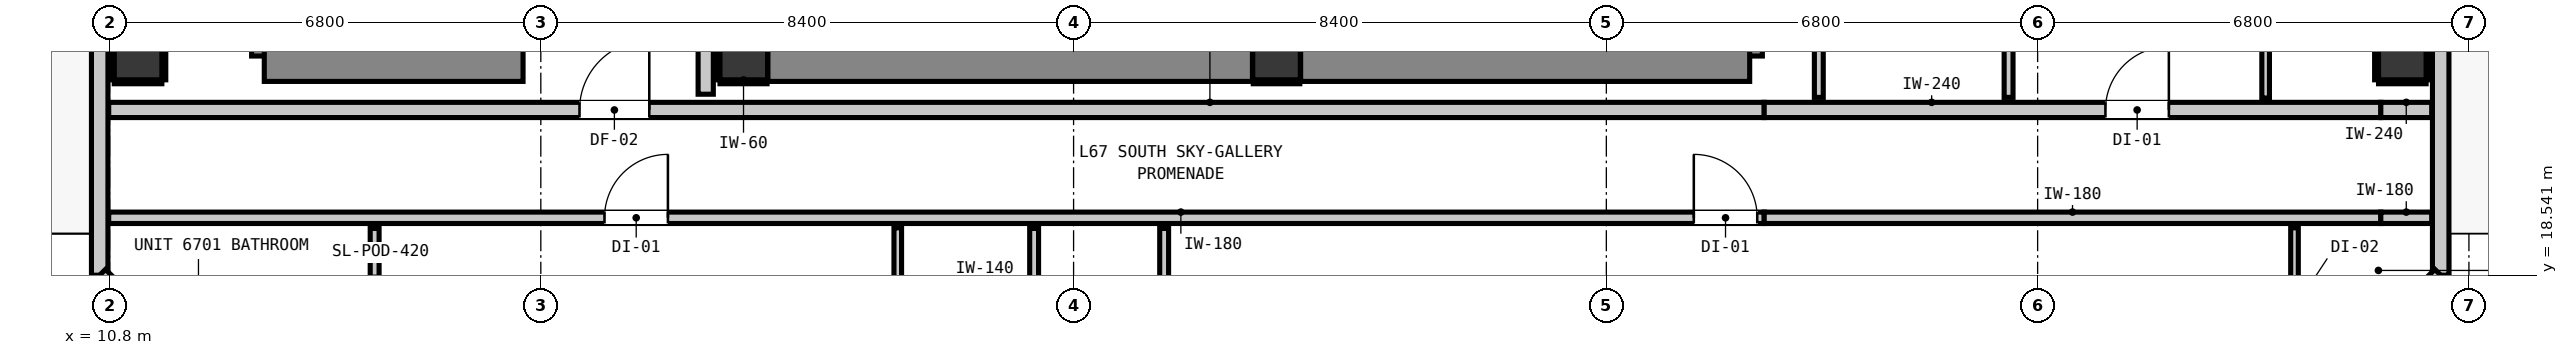
"""IFC4 building model, lengths in metres.
Left out: names, types, materials, properties, quantities, classifications, styles, units other than length and angle.
Written with IfcOpenShell. Run it as: python <this file> out.ifc"""

import sys

from ifc_helpers import new_model, si_unit, direction, frame, frame_2d, origin, origin_2d, place, context, subcontext, project, spatial, rectangle, extrude, element, fill, save


model = new_model("IFC4")
c1 = context("Model", 3, precision=1e-05, world=origin(), true_north=direction((0.0, 1.0)))
c2 = subcontext(c1, "Body", "Model", "MODEL_VIEW")
j1 = project(units=[si_unit("LENGTHUNIT", "METRE"), si_unit("PLANEANGLEUNIT", "RADIAN")], contexts=[c1])
p1 = place(None, origin())
s1 = spatial("IfcSite", under=j1, at=p1, CompositionType="ELEMENT")
p2 = place(p1, origin())
s2 = spatial("IfcBuilding", under=s1, at=p2, CompositionType="ELEMENT")
p3 = place(p2, frame((0.0, 0.0, 231.28)))
s3 = spatial("IfcBuildingStorey", under=s2, at=p3, CompositionType="ELEMENT", Elevation=231.28)
for number, where, z_axis, x_axis in (
    (1, (20.8, 22.0, 0.0), (0.0, 0.0, 1.0), (1.0, 0.0, 0.0)),
    (2, (29.2, 22.0, 0.0), (0.0, 0.0, 1.0), (1.0, 0.0, 0.0)),
):
    element("IfcColumn", number, at=place(p3, frame(where, z_axis=z_axis, x_axis=x_axis)), inside=s3, PredefinedType="COLUMN", context=c2, shape_type="SweptSolid", body=[
        extrude(rectangle(XDim=0.75, YDim=0.75, at=origin_2d()), origin(), (0.0, 0.0, 1.0), 3.32),
    ])
p4 = place(p3, frame((13.44, 22.0, 0.0), z_axis=(0.0, 0.0, 1.0), x_axis=(0.0, 1.0, 0.0)))
e3 = element("IfcWall", 3, at=p4, inside=s3, PredefinedType="SHEAR", context=c2, shape_type="SweptSolid", body=[
    extrude(rectangle(XDim=8.32, YDim=0.8, at=frame_2d((4.16, 0.0))), origin(), (0.0, 0.0, 1.0), 3.32),
])
p5 = place(p3, frame((13.24, 22.0, 0.0), z_axis=(0.0, 0.0, 1.0), x_axis=(1.0, 0.0, 0.0)))
e4 = element("IfcWall", 4, at=p5, inside=s3, PredefinedType="SHEAR", context=c2, shape_type="SweptSolid", body=[
    extrude(rectangle(XDim=4.08, YDim=0.8, at=frame_2d((2.04, 0.0))), origin(), (0.0, 0.0, 1.0), 3.32),
])
p6 = place(p3, frame((36.46, 22.0, 0.0), z_axis=(0.0, 0.0, 1.0), x_axis=(0.0, 1.0, 0.0)))
e5 = element("IfcWall", 5, at=p6, inside=s3, PredefinedType="SHEAR", context=c2, shape_type="SweptSolid", body=[
    extrude(rectangle(XDim=8.32, YDim=0.8, at=frame_2d((4.16, 0.0))), origin(), (0.0, 0.0, 1.0), 3.32),
])
p7 = place(p3, frame((29.58, 22.0, 0.0), z_axis=(0.0, 0.0, 1.0), x_axis=(1.0, 0.0, 0.0)))
e6 = element("IfcWall", 6, at=p7, inside=s3, PredefinedType="SHEAR", context=c2, shape_type="SweptSolid", body=[
    extrude(rectangle(XDim=7.08, YDim=0.8, at=frame_2d((3.54, 0.0))), origin(), (0.0, 0.0, 1.0), 3.32),
])
p8 = place(p3, frame((21.18, 22.0, 0.0), z_axis=(0.0, 0.0, 1.0), x_axis=(1.0, 0.0, 0.0)))
e7 = element("IfcWall", 7, at=p8, inside=s3, PredefinedType="SHEAR", context=c2, shape_type="SweptSolid", body=[
    extrude(rectangle(XDim=7.64, YDim=0.8, at=frame_2d((3.82, 0.0))), origin(), (0.0, 0.0, 1.0), 3.32),
])
for number, where, z_axis, x_axis in (
    (8, (11.25, 22.0, -0.2), (0.0, 0.0, 1.0), (1.0, 0.0, 0.0)),
    (9, (46.95, 22.0, -0.2), (0.0, 0.0, 1.0), (1.0, 0.0, 0.0)),
):
    element("IfcColumn", number, at=place(p3, frame(where, z_axis=z_axis, x_axis=x_axis)), inside=s3, PredefinedType="COLUMN", context=c2, shape_type="SweptSolid", body=[
        extrude(rectangle(XDim=0.75, YDim=0.75, at=origin_2d()), origin(), (0.0, 0.0, 1.0), 3.52),
    ])
p9 = place(p3, frame((10.645, 18.545, 0.0), z_axis=(0.0, 0.0, 1.0), x_axis=(0.0, 1.0, 0.0)))
e10 = element("IfcWall", 10, at=p9, inside=s3, PredefinedType="STANDARD", context=c2, shape_type="SweptSolid", body=[
    extrude(rectangle(XDim=30.31, YDim=0.26, at=frame_2d((15.155, 0.0))), origin(), (0.0, 0.0, 1.0), 3.1),
])
p10 = place(p9, frame((27.695, 0.0, 0.0)))
e11 = element("IfcOpeningElement", 11, at=p10, cuts=e10, PredefinedType="OPENING", context=c2, shape_type="SweptSolid", body=[
    extrude(rectangle(XDim=1.0, YDim=2.15, at=frame_2d((0.5, 1.075))), frame((0.0, 0.14, 0.0), z_axis=(0.0, -1.0, 0.0), x_axis=(1.0, 0.0, 0.0)), (0.0, 0.0, 1.0), 0.28),
])
p11 = place(p9, frame((29.108, 0.0, 0.85)))
e12 = element("IfcOpeningElement", 12, at=p11, cuts=e10, PredefinedType="OPENING", context=c2, shape_type="SweptSolid", body=[
    extrude(rectangle(XDim=0.9, YDim=1.5, at=frame_2d((0.45, 0.75))), frame((0.0, 0.14, 0.0), z_axis=(0.0, -1.0, 0.0), x_axis=(1.0, 0.0, 0.0)), (0.0, 0.0, 1.0), 0.28),
])
p12 = place(p3, frame((47.555, 48.855, 0.0), z_axis=(0.0, 0.0, 1.0), x_axis=(0.0, -1.0, 0.0)))
e13 = element("IfcWall", 13, at=p12, inside=s3, PredefinedType="STANDARD", context=c2, shape_type="SweptSolid", body=[
    extrude(rectangle(XDim=30.31, YDim=0.26, at=frame_2d((15.155, 0.0))), origin(), (0.0, 0.0, 1.0), 3.1),
])
p13 = place(p12, frame((0.91, 0.0, 0.0)))
e14 = element("IfcOpeningElement", 14, at=p13, cuts=e13, PredefinedType="OPENING", context=c2, shape_type="SweptSolid", body=[
    extrude(rectangle(XDim=1.0, YDim=2.15, at=frame_2d((0.5, 1.075))), frame((0.0, 0.14, 0.0), z_axis=(0.0, -1.0, 0.0), x_axis=(1.0, 0.0, 0.0)), (0.0, 0.0, 1.0), 0.28),
])
p14 = place(p12, frame((3.107, 0.0, 0.85)))
e15 = element("IfcOpeningElement", 15, at=p14, cuts=e13, PredefinedType="OPENING", context=c2, shape_type="SweptSolid", body=[
    extrude(rectangle(XDim=2.7, YDim=2.0, at=frame_2d((1.35, 1.0))), frame((0.0, 0.14, 0.0), z_axis=(0.0, -1.0, 0.0), x_axis=(1.0, 0.0, 0.0)), (0.0, 0.0, 1.0), 0.28),
])
for number, where, z_axis, x_axis in (
    (16, (47.555, 18.545, 0.0), (0.0, 0.0, 1.0), (-0.707, -0.707, 0.0)),
    (17, (12.745, 16.445, 0.0), (0.0, 0.0, 1.0), (-0.707, 0.707, 0.0)),
):
    element("IfcWall", number, at=place(p3, frame(where, z_axis=z_axis, x_axis=x_axis)), inside=s3, PredefinedType="STANDARD", context=c2, shape_type="SweptSolid", body=[
        extrude(rectangle(XDim=2.97, YDim=0.26, at=frame_2d((1.485, 0.0))), origin(), (0.0, 0.0, 1.0), 3.1),
    ])
p15 = place(p3, frame((10.787, 21.15, 0.0), z_axis=(0.0, 0.0, 1.0), x_axis=(1.0, 0.0, 0.0)))
e18 = element("IfcWall", 18, at=p15, inside=s3, PredefinedType="PARTITIONING", context=c2, shape_type="SweptSolid", body=[
    extrude(rectangle(XDim=26.102, YDim=0.24, at=frame_2d((13.051, 0.0))), origin(), (0.0, 0.0, 1.0), 3.1),
])
p16 = place(p15, frame((7.423, 0.0, 0.0)))
e19 = element("IfcOpeningElement", 19, at=p16, cuts=e18, PredefinedType="OPENING", context=c2, shape_type="SweptSolid", body=[
    extrude(rectangle(XDim=1.1, YDim=2.15, at=frame_2d((0.55, 1.075))), frame((0.0, 0.13, 0.0), z_axis=(0.0, -1.0, 0.0), x_axis=(1.0, 0.0, 0.0)), (0.0, 0.0, 1.0), 0.26),
])
p17 = place(p3, frame((36.889, 21.15, 0.0), z_axis=(0.0, 0.0, 1.0), x_axis=(1.0, 0.0, 0.0)))
e20 = element("IfcWall", 20, at=p17, inside=s3, PredefinedType="PARTITIONING", context=c2, shape_type="SweptSolid", body=[
    extrude(rectangle(XDim=9.722, YDim=0.24, at=frame_2d((4.861, 0.0))), origin(), (0.0, 0.0, 1.0), 2.477),
])
p18 = place(p17, frame((5.38, 0.0, 0.0)))
e21 = element("IfcOpeningElement", 21, at=p18, cuts=e20, PredefinedType="OPENING", context=c2, shape_type="SweptSolid", body=[
    extrude(rectangle(XDim=1.0, YDim=2.15, at=frame_2d((0.5, 1.075))), frame((0.0, 0.13, 0.0), z_axis=(0.0, -1.0, 0.0), x_axis=(1.0, 0.0, 0.0)), (0.0, 0.0, 1.0), 0.26),
])
p19 = place(p3, frame((46.611, 21.15, 0.0), z_axis=(0.0, 0.0, 1.0), x_axis=(1.0, 0.0, 0.0)))
e22 = element("IfcWall", 22, at=p19, inside=s3, PredefinedType="PARTITIONING", context=c2, shape_type="SweptSolid", body=[
    extrude(rectangle(XDim=0.802, YDim=0.24, at=frame_2d((0.401, 0.0))), origin(), (0.0, 0.0, 1.0), 3.1),
])
p20 = place(p3, frame((10.787, 19.45, 0.0), z_axis=(0.0, 0.0, 1.0), x_axis=(1.0, 0.0, 0.0)))
e23 = element("IfcWall", 23, at=p20, inside=s3, PredefinedType="PARTITIONING", context=c2, shape_type="SweptSolid", body=[
    extrude(rectangle(XDim=26.102, YDim=0.18, at=frame_2d((13.051, 0.0))), origin(), (0.0, 0.0, 1.0), 3.1),
])
p21 = place(p20, frame((7.817, 0.0, 0.0)))
e24 = element("IfcOpeningElement", 24, at=p21, cuts=e23, PredefinedType="OPENING", context=c2, shape_type="SweptSolid", body=[
    extrude(rectangle(XDim=1.0, YDim=2.15, at=frame_2d((0.5, 1.075))), frame((0.0, 0.1, 0.0), z_axis=(0.0, -1.0, 0.0), x_axis=(1.0, 0.0, 0.0)), (0.0, 0.0, 1.0), 0.2),
])
p22 = place(p20, frame((24.992, 0.0, 0.0)))
e25 = element("IfcOpeningElement", 25, at=p22, cuts=e23, PredefinedType="OPENING", context=c2, shape_type="SweptSolid", body=[
    extrude(rectangle(XDim=1.0, YDim=2.15, at=frame_2d((0.5, 1.075))), frame((0.0, 0.1, 0.0), z_axis=(0.0, -1.0, 0.0), x_axis=(1.0, 0.0, 0.0)), (0.0, 0.0, 1.0), 0.2),
])
p23 = place(p3, frame((36.889, 19.45, 0.0), z_axis=(0.0, 0.0, 1.0), x_axis=(1.0, 0.0, 0.0)))
e26 = element("IfcWall", 26, at=p23, inside=s3, PredefinedType="PARTITIONING", context=c2, shape_type="SweptSolid", body=[
    extrude(rectangle(XDim=9.722, YDim=0.18, at=frame_2d((4.861, 0.0))), origin(), (0.0, 0.0, 1.0), 2.477),
])
p24 = place(p3, frame((46.611, 19.45, 0.0), z_axis=(0.0, 0.0, 1.0), x_axis=(1.0, 0.0, 0.0)))
e27 = element("IfcWall", 27, at=p24, inside=s3, PredefinedType="PARTITIONING", context=c2, shape_type="SweptSolid", body=[
    extrude(rectangle(XDim=0.802, YDim=0.18, at=frame_2d((0.401, 0.0))), origin(), (0.0, 0.0, 1.0), 3.1),
])
p25 = place(p3, frame((20.2, 21.398, 0.0), z_axis=(0.0, 0.0, 1.0), x_axis=(0.0, 1.0, 0.0)))
e28 = element("IfcWall", 28, at=p25, inside=s3, PredefinedType="PARTITIONING", context=c2, shape_type="SweptSolid", body=[
    extrude(rectangle(XDim=6.754, YDim=0.24, at=frame_2d((3.377, 0.0))), origin(), (0.0, 0.0, 1.0), 3.1),
])
p26 = place(p3, frame((14.98, 16.587, 0.0), z_axis=(0.0, 0.0, 1.0), x_axis=(0.0, 1.0, 0.0)))
e29 = element("IfcWall", 29, at=p26, inside=s3, PredefinedType="PARTITIONING", context=c2, shape_type="SweptSolid", body=[
    extrude(rectangle(XDim=2.695, YDim=0.14, at=frame_2d((1.348, 0.0))), origin(), (0.0, 0.0, 1.0), 3.1),
])
p27 = place(p26, frame((1.088, 0.0, 0.0)))
e30 = element("IfcOpeningElement", 30, at=p27, cuts=e29, PredefinedType="OPENING", context=c2, shape_type="SweptSolid", body=[
    extrude(rectangle(XDim=0.86, YDim=2.02, at=frame_2d((0.43, 1.01))), frame((0.0, 0.08, 0.0), z_axis=(0.0, -1.0, 0.0), x_axis=(1.0, 0.0, 0.0)), (0.0, 0.0, 1.0), 0.16),
])
p28 = place(p3, frame((25.378, 16.587, 0.0), z_axis=(0.0, 0.0, 1.0), x_axis=(0.0, 1.0, 0.0)))
e31 = element("IfcWall", 31, at=p28, inside=s3, PredefinedType="PARTITIONING", context=c2, shape_type="SweptSolid", body=[
    extrude(rectangle(XDim=2.695, YDim=0.14, at=frame_2d((1.348, 0.0))), origin(), (0.0, 0.0, 1.0), 3.1),
])
p29 = place(p3, frame((27.428, 16.587, 0.0), z_axis=(0.0, 0.0, 1.0), x_axis=(0.0, 1.0, 0.0)))
e32 = element("IfcWall", 32, at=p29, inside=s3, PredefinedType="PARTITIONING", context=c2, shape_type="SweptSolid", body=[
    extrude(rectangle(XDim=2.695, YDim=0.14, at=frame_2d((1.348, 0.0))), origin(), (0.0, 0.0, 1.0), 3.1),
])
p30 = place(p29, frame((1.008, 0.0, 0.0)))
e33 = element("IfcOpeningElement", 33, at=p30, cuts=e32, PredefinedType="OPENING", context=c2, shape_type="SweptSolid", body=[
    extrude(rectangle(XDim=0.86, YDim=2.02, at=frame_2d((0.43, 1.01))), frame((0.0, 0.08, 0.0), z_axis=(0.0, -1.0, 0.0), x_axis=(1.0, 0.0, 0.0)), (0.0, 0.0, 1.0), 0.16),
])
p31 = place(p3, frame((37.75, 21.348, 0.0), z_axis=(0.0, 0.0, 1.0), x_axis=(0.0, 1.0, 0.0)))
e34 = element("IfcWall", 34, at=p31, inside=s3, PredefinedType="PARTITIONING", context=c2, shape_type="SweptSolid", body=[
    extrude(rectangle(XDim=4.004, YDim=0.14, at=frame_2d((2.002, 0.0))), origin(), (0.0, 0.0, 1.0), 3.1),
])
p32 = place(p3, frame((40.742, 21.348, 0.0), z_axis=(0.0, 0.0, 1.0), x_axis=(0.0, 1.0, 0.0)))
e35 = element("IfcWall", 35, at=p32, inside=s3, PredefinedType="PARTITIONING", context=c2, shape_type="SweptSolid", body=[
    extrude(rectangle(XDim=4.004, YDim=0.14, at=frame_2d((2.002, 0.0))), origin(), (0.0, 0.0, 1.0), 3.1),
])
p33 = place(p32, frame((1.56, 0.0, 0.0)))
e36 = element("IfcOpeningElement", 36, at=p33, cuts=e35, PredefinedType="OPENING", context=c2, shape_type="SweptSolid", body=[
    extrude(rectangle(XDim=0.86, YDim=2.02, at=frame_2d((0.43, 1.01))), frame((0.0, 0.08, 0.0), z_axis=(0.0, -1.0, 0.0), x_axis=(1.0, 0.0, 0.0)), (0.0, 0.0, 1.0), 0.16),
])
p34 = place(p3, frame((23.228, 16.587, 0.0), z_axis=(0.0, 0.0, 1.0), x_axis=(0.0, 1.0, 0.0)))
e37 = element("IfcWall", 37, at=p34, inside=s3, PredefinedType="PARTITIONING", context=c2, shape_type="SweptSolid", body=[
    extrude(rectangle(XDim=2.705, YDim=0.12, at=frame_2d((1.353, 0.0))), origin(), (0.0, 0.0, 1.0), 3.1),
])
p35 = place(p34, frame((0.988, 0.0, 0.0)))
e38 = element("IfcOpeningElement", 38, at=p35, cuts=e37, PredefinedType="OPENING", context=c2, shape_type="SweptSolid", body=[
    extrude(rectangle(XDim=0.9, YDim=2.1, at=frame_2d((0.45, 1.05))), frame((0.0, 0.07, 0.0), z_axis=(0.0, -1.0, 0.0), x_axis=(1.0, 0.0, 0.0)), (0.0, 0.0, 1.0), 0.14),
])
p36 = place(p3, frame((44.795, 21.338, 0.0), z_axis=(0.0, 0.0, 1.0), x_axis=(0.0, 1.0, 0.0)))
e39 = element("IfcWall", 39, at=p36, inside=s3, PredefinedType="PARTITIONING", context=c2, shape_type="SweptSolid", body=[
    extrude(rectangle(XDim=9.224, YDim=0.12, at=frame_2d((4.612, 0.0))), origin(), (0.0, 0.0, 1.0), 3.1),
])
p37 = place(p36, frame((4.137, 0.0, 0.0)))
e40 = element("IfcOpeningElement", 40, at=p37, cuts=e39, PredefinedType="OPENING", context=c2, shape_type="SweptSolid", body=[
    extrude(rectangle(XDim=0.9, YDim=2.1, at=frame_2d((0.45, 1.05))), frame((0.0, 0.07, 0.0), z_axis=(0.0, -1.0, 0.0), x_axis=(1.0, 0.0, 0.0)), (0.0, 0.0, 1.0), 0.14),
])
p38 = place(p3, frame((45.25, 16.587, 0.0), z_axis=(0.0, 0.0, 1.0), x_axis=(0.0, 1.0, 0.0)))
e41 = element("IfcWall", 41, at=p38, inside=s3, PredefinedType="PARTITIONING", context=c2, shape_type="SweptSolid", body=[
    extrude(rectangle(XDim=2.705, YDim=0.12, at=frame_2d((1.353, 0.0))), origin(), (0.0, 0.0, 1.0), 3.1),
])
p39 = place(p38, frame((0.988, 0.0, 0.0)))
e42 = element("IfcOpeningElement", 42, at=p39, cuts=e41, PredefinedType="OPENING", context=c2, shape_type="SweptSolid", body=[
    extrude(rectangle(XDim=0.9, YDim=2.1, at=frame_2d((0.45, 1.05))), frame((0.0, 0.07, 0.0), z_axis=(0.0, -1.0, 0.0), x_axis=(1.0, 0.0, 0.0)), (0.0, 0.0, 1.0), 0.14),
])
p40 = place(p3, frame((20.425, 21.593, 0.0), z_axis=(0.0, 0.0, 1.0), x_axis=(1.0, 0.0, 0.0)))
e43 = element("IfcWall", 43, at=p40, inside=s3, PredefinedType="PARTITIONING", context=c2, shape_type="SweptSolid", body=[
    extrude(rectangle(XDim=0.742, YDim=0.06, at=frame_2d((0.371, 0.0))), origin(), (0.0, 0.0, 1.0), 1.45),
])
p41 = place(p3, frame((20.393, 21.625, 0.0), z_axis=(0.0, 0.0, 1.0), x_axis=(0.0, 1.0, 0.0)))
e44 = element("IfcWall", 44, at=p41, inside=s3, PredefinedType="PARTITIONING", context=c2, shape_type="SweptSolid", body=[
    extrude(rectangle(XDim=0.75, YDim=0.06, at=frame_2d((0.375, 0.0))), origin(), (0.0, 0.0, 1.0), 1.45),
])
p42 = place(p3, frame((28.833, 21.593, 0.0), z_axis=(0.0, 0.0, 1.0), x_axis=(1.0, 0.0, 0.0)))
e45 = element("IfcWall", 45, at=p42, inside=s3, PredefinedType="PARTITIONING", context=c2, shape_type="SweptSolid", body=[
    extrude(rectangle(XDim=0.734, YDim=0.06, at=frame_2d((0.367, 0.0))), origin(), (0.0, 0.0, 1.0), 1.45),
])
for number, where, z_axis, x_axis in (
    (46, (10.875, 21.593, 0.0), (0.0, 0.0, 1.0), (1.0, 0.0, 0.0)),
    (47, (10.843, 21.625, 0.0), (0.0, 0.0, 1.0), (0.0, 1.0, 0.0)),
    (48, (11.657, 21.625, 0.0), (0.0, 0.0, 1.0), (0.0, 1.0, 0.0)),
    (49, (46.575, 21.593, 0.0), (0.0, 0.0, 1.0), (1.0, 0.0, 0.0)),
    (50, (46.543, 21.625, 0.0), (0.0, 0.0, 1.0), (0.0, 1.0, 0.0)),
    (51, (47.357, 21.625, 0.0), (0.0, 0.0, 1.0), (0.0, 1.0, 0.0)),
):
    element("IfcWall", number, at=place(p3, frame(where, z_axis=z_axis, x_axis=x_axis)), inside=s3, PredefinedType="PARTITIONING", context=c2, shape_type="SweptSolid", body=[
        extrude(rectangle(XDim=0.75, YDim=0.06, at=frame_2d((0.375, 0.0))), origin(), (0.0, 0.0, 1.0), 1.45),
    ])
p43 = place(p16, origin())
e52 = element("IfcDoor", 52, at=p43, inside=s3, OperationType="SINGLE_SWING_RIGHT", PredefinedType="DOOR", context=c2, shape_type="SweptSolid", body=[
    extrude(rectangle(XDim=1.1, YDim=2.15, at=frame_2d((0.55, 1.075))), frame((0.0, 0.025, 0.0), z_axis=(0.0, -1.0, 0.0), x_axis=(1.0, 0.0, 0.0)), (0.0, 0.0, 1.0), 0.05),
])
fill(e19, e52)
p44 = place(p21, origin())
e53 = element("IfcDoor", 53, at=p44, inside=s3, OperationType="SINGLE_SWING_RIGHT", PredefinedType="DOOR", context=c2, shape_type="SweptSolid", body=[
    extrude(rectangle(XDim=1.0, YDim=2.15, at=frame_2d((0.5, 1.075))), frame((0.0, 0.025, 0.0), z_axis=(0.0, -1.0, 0.0), x_axis=(1.0, 0.0, 0.0)), (0.0, 0.0, 1.0), 0.05),
])
fill(e24, e53)
p45 = place(p22, origin())
e54 = element("IfcDoor", 54, at=p45, inside=s3, OperationType="SINGLE_SWING_LEFT", PredefinedType="DOOR", context=c2, shape_type="SweptSolid", body=[
    extrude(rectangle(XDim=1.0, YDim=2.15, at=frame_2d((0.5, 1.075))), frame((0.0, 0.025, 0.0), z_axis=(0.0, -1.0, 0.0), x_axis=(1.0, 0.0, 0.0)), (0.0, 0.0, 1.0), 0.05),
])
fill(e25, e54)
p46 = place(p18, origin())
e55 = element("IfcDoor", 55, at=p46, inside=s3, OperationType="SINGLE_SWING_RIGHT", PredefinedType="DOOR", context=c2, shape_type="SweptSolid", body=[
    extrude(rectangle(XDim=1.0, YDim=2.15, at=frame_2d((0.5, 1.075))), frame((0.0, 0.025, 0.0), z_axis=(0.0, -1.0, 0.0), x_axis=(1.0, 0.0, 0.0)), (0.0, 0.0, 1.0), 0.05),
])
fill(e21, e55)
save(model, sys.argv[1])
